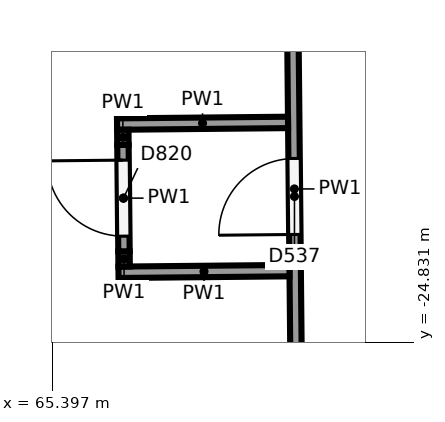
"""IFC4 building model, lengths in metres.
Left out: names, types, materials, properties, quantities, classifications, styles, units other than length and angle.
Written with IfcOpenShell. Run it as: python <this file> out.ifc"""

import sys

from ifc_helpers import new_model, si_unit, direction, frame, frame_2d, origin, place, context, subcontext, project, spatial, rectangle, extrude, element, fill, save


model = new_model("IFC4")
c1 = context("Model", 3, precision=1e-05, world=origin(), true_north=direction((0.0, 1.0)))
c2 = subcontext(c1, "Body", "Model", "MODEL_VIEW")
j1 = project(units=[si_unit("LENGTHUNIT", "METRE"), si_unit("PLANEANGLEUNIT", "RADIAN")], contexts=[c1])
p1 = place(None, origin())
s1 = spatial("IfcSite", under=j1, at=p1, CompositionType="ELEMENT")
p2 = place(p1, origin())
s2 = spatial("IfcBuilding", under=s1, at=p2, CompositionType="ELEMENT")
p3 = place(p2, origin())
s3 = spatial("IfcBuildingStorey", under=s2, at=p3, CompositionType="ELEMENT", Elevation=0.0)
p4 = place(p3, frame((68.628, -27.361, 0.0), z_axis=(0.0, 0.0, 1.0), x_axis=(-0.009740581754, 0.999952559408, 0.0)))
e1 = element("IfcWall", 1, at=p4, inside=s3, PredefinedType="PARTITIONING", context=c2, shape_type="SweptSolid", body=[
    extrude(rectangle(XDim=9.098, YDim=0.15, at=frame_2d((4.549, 0.0))), origin(), (0.0, 0.0, 1.0), 6.15),
])
p5 = place(p4, frame((3.95, 0.0, 0.0)))
e2 = element("IfcOpeningElement", 2, at=p5, cuts=e1, PredefinedType="OPENING", context=c2, shape_type="SweptSolid", body=[
    extrude(rectangle(XDim=1.0, YDim=2.1, at=frame_2d((0.5, 1.05))), frame((0.0, 0.085, 0.0), z_axis=(0.0, -1.0, 0.0), x_axis=(1.0, 0.0, 0.0)), (0.0, 0.0, 1.0), 0.17),
])
for number, where, z_axis, x_axis in (
    (3, (68.52, -23.887, 0.0), (0.0, 0.0, 1.0), (-1.0, -0.01, 0.0)),
    (4, (68.5, -21.937, 0.0), (0.0, 0.0, 1.0), (-1.0, -0.01, 0.0)),
):
    element("IfcWall", number, at=place(p3, frame(where, z_axis=z_axis, x_axis=x_axis)), inside=s3, PredefinedType="PARTITIONING", context=c2, shape_type="SweptSolid", body=[
        extrude(rectangle(XDim=2.25, YDim=0.15, at=frame_2d((1.125, 0.0))), origin(), (0.0, 0.0, 1.0), 6.15),
    ])
p6 = place(p3, frame((66.344, -23.833, 0.0), z_axis=(0.0, 0.0, 1.0), x_axis=(-0.009755633294, 0.999952412677, 0.0)))
e5 = element("IfcWall", 5, at=p6, inside=s3, PredefinedType="PARTITIONING", context=c2, shape_type="SweptSolid", body=[
    extrude(rectangle(XDim=0.2, YDim=0.15, at=frame_2d((0.1, 0.0))), origin(), (0.0, 0.0, 1.0), 6.15),
])
p7 = place(p3, frame((66.342, -23.633, 0.0), z_axis=(0.0, 0.0, 1.0), x_axis=(-0.009765840518, 0.999952313042, 0.0)))
e6 = element("IfcWall", 6, at=p7, inside=s3, PredefinedType="PARTITIONING", context=c2, shape_type="SweptSolid", body=[
    extrude(rectangle(XDim=1.4, YDim=0.15, at=frame_2d((0.7, 0.0))), origin(), (0.0, 0.0, 1.0), 6.15),
])
p8 = place(p7, frame((0.2, 0.0, 0.0)))
e7 = element("IfcOpeningElement", 7, at=p8, cuts=e6, PredefinedType="OPENING", context=c2, shape_type="SweptSolid", body=[
    extrude(rectangle(XDim=1.0, YDim=2.1, at=frame_2d((0.5, 1.05))), frame((0.0, 0.085, 0.0), z_axis=(0.0, -1.0, 0.0), x_axis=(1.0, 0.0, 0.0)), (0.0, 0.0, 1.0), 0.17),
])
p9 = place(p3, frame((66.328, -22.233, 0.0), z_axis=(0.0, 0.0, 1.0), x_axis=(-0.009767543799, 0.999952296406, 0.0)))
e8 = element("IfcWall", 8, at=p9, inside=s3, PredefinedType="PARTITIONING", context=c2, shape_type="SweptSolid", body=[
    extrude(rectangle(XDim=0.2, YDim=0.15, at=frame_2d((0.1, 0.0))), origin(), (0.0, 0.0, 1.0), 6.15),
])
p10 = place(p5, origin())
e9 = element("IfcDoor", 9, at=p10, inside=s3, OperationType="SINGLE_SWING_LEFT", PredefinedType="DOOR", context=c2, shape_type="SweptSolid", body=[
    extrude(rectangle(XDim=1.0, YDim=2.1, at=frame_2d((0.5, 1.05))), frame((0.0, 0.025, 0.0), z_axis=(0.0, -1.0, 0.0), x_axis=(1.0, 0.0, 0.0)), (0.0, 0.0, 1.0), 0.05),
])
fill(e2, e9)
p11 = place(p8, origin())
e10 = element("IfcDoor", 10, at=p11, inside=s3, OperationType="SINGLE_SWING_RIGHT", PredefinedType="DOOR", context=c2, shape_type="SweptSolid", body=[
    extrude(rectangle(XDim=1.0, YDim=2.1, at=frame_2d((0.5, 1.05))), frame((0.0, 0.025, 0.0), z_axis=(0.0, -1.0, 0.0), x_axis=(1.0, 0.0, 0.0)), (0.0, 0.0, 1.0), 0.05),
])
fill(e7, e10)
save(model, sys.argv[1])
